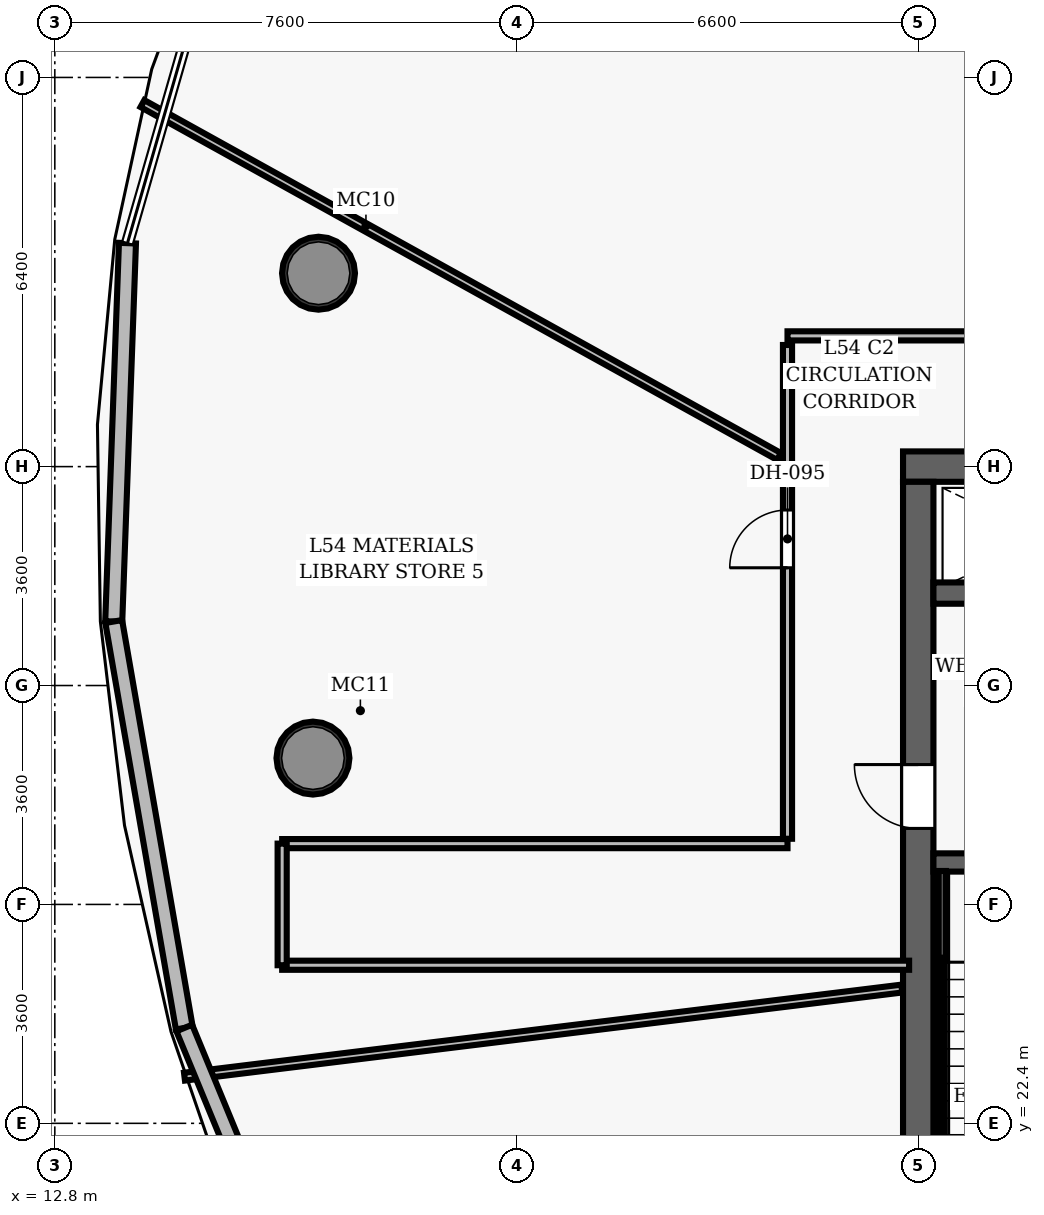
"""IFC4 building model, lengths in metres.
Left out: names, types, materials, properties, quantities, classifications, styles, units other than length and angle.
Written with IfcOpenShell. Run it as: python <this file> out.ifc"""

import sys

from ifc_helpers import new_model, si_unit, direction, frame, frame_2d, origin, origin_2d, place, context, subcontext, project, spatial, rectangle, hollow_circle, extrude, element, fill, save


model = new_model("IFC4")
c1 = context("Model", 3, precision=1e-05, world=origin(), true_north=direction((0.0, 1.0)))
c2 = subcontext(c1, "Body", "Model", "MODEL_VIEW")
j1 = project(units=[si_unit("LENGTHUNIT", "METRE"), si_unit("PLANEANGLEUNIT", "RADIAN")], contexts=[c1])
p1 = place(None, origin())
s1 = spatial("IfcSite", under=j1, at=p1, CompositionType="ELEMENT")
p2 = place(p1, origin())
s2 = spatial("IfcBuilding", under=s1, at=p2, CompositionType="ELEMENT")
p3 = place(p2, frame((0.0, 0.0, 213.55)))
s3 = spatial("IfcBuildingStorey", under=s2, at=p3, CompositionType="ELEMENT", Elevation=213.55)
p4 = place(p3, frame((26.75, 33.2, 0.0), z_axis=(0.0, 0.0, 1.0), x_axis=(1.0, 0.0, 0.0)))
e1 = element("IfcWall", 1, at=p4, inside=s3, PredefinedType="SHEAR", context=c2, shape_type="SweptSolid", body=[
    extrude(rectangle(XDim=22.5, YDim=0.5, at=frame_2d((11.25, 0.0))), origin(), (0.0, 0.0, 1.0), 3.85),
])
p5 = place(p4, frame((4.57, 0.0, 0.0)))
e2 = element("IfcOpeningElement", 2, at=p5, cuts=e1, PredefinedType="OPENING", context=c2, shape_type="SweptSolid", body=[
    extrude(rectangle(XDim=1.05, YDim=2.15, at=frame_2d((0.525, 1.075))), frame((0.0, 0.26, 0.0), z_axis=(0.0, -1.0, 0.0), x_axis=(1.0, 0.0, 0.0)), (0.0, 0.0, 1.0), 0.52),
])
p6 = place(p4, frame((14.47, 0.0, 0.0)))
e3 = element("IfcOpeningElement", 3, at=p6, cuts=e1, PredefinedType="OPENING", context=c2, shape_type="SweptSolid", body=[
    extrude(rectangle(XDim=1.05, YDim=2.15, at=frame_2d((0.525, 1.075))), frame((0.0, 0.26, 0.0), z_axis=(0.0, -1.0, 0.0), x_axis=(1.0, 0.0, 0.0)), (0.0, 0.0, 1.0), 0.52),
])
p7 = place(p3, frame((27.0, 19.05, 0.0), z_axis=(0.0, 0.0, 1.0), x_axis=(0.0, 1.0, 0.0)))
e4 = element("IfcWall", 4, at=p7, inside=s3, PredefinedType="SHEAR", context=c2, shape_type="SweptSolid", body=[
    extrude(rectangle(XDim=13.9, YDim=0.5, at=frame_2d((6.95, 0.0))), origin(), (0.0, 0.0, 1.0), 3.85),
])
p8 = place(p7, frame((8.2, 0.0, 0.0)))
e5 = element("IfcOpeningElement", 5, at=p8, cuts=e4, PredefinedType="OPENING", context=c2, shape_type="SweptSolid", body=[
    extrude(rectangle(XDim=1.05, YDim=2.15, at=frame_2d((0.525, 1.075))), frame((0.0, 0.26, 0.0), z_axis=(0.0, -1.0, 0.0), x_axis=(1.0, 0.0, 0.0)), (0.0, 0.0, 1.0), 0.52),
])
for number, where, z_axis, x_axis in (
    (6, (17.137, 36.381, 0.0), (0.0, 0.0, 1.0), (1.0, 0.0, 0.0)),
    (7, (17.045, 28.406, 0.0), (0.0, 0.0, 1.0), (1.0, 0.0, 0.0)),
):
    element("IfcColumn", number, at=place(p3, frame(where, z_axis=z_axis, x_axis=x_axis)), inside=s3, PredefinedType="COLUMN", context=c2, shape_type="SweptSolid", body=[
        extrude(hollow_circle(Radius=0.6, WallThickness=0.05, at=origin_2d()), origin(), (0.0, 0.0, 1.0), 3.85),
    ])
p9 = place(p3, frame((27.25, 26.69, 0.0), z_axis=(0.0, 0.0, 1.0), x_axis=(1.0, 0.0, 0.0)))
e8 = element("IfcWall", 8, at=p9, inside=s3, PredefinedType="SHEAR", context=c2, shape_type="SweptSolid", body=[
    extrude(rectangle(XDim=3.67, YDim=0.3, at=frame_2d((1.835, 0.0))), origin(), (0.0, 0.0, 1.0), 3.85),
])
p10 = place(p9, frame((1.05, 0.0, 0.0)))
e9 = element("IfcOpeningElement", 9, at=p10, cuts=e8, PredefinedType="OPENING", context=c2, shape_type="SweptSolid", body=[
    extrude(rectangle(XDim=1.1, YDim=2.15, at=frame_2d((0.55, 1.075))), frame((0.0, 0.16, 0.0), z_axis=(0.0, -1.0, 0.0), x_axis=(1.0, 0.0, 0.0)), (0.0, 0.0, 1.0), 0.32),
])
p11 = place(p3, frame((27.395, 19.1, 0.0), z_axis=(0.0, 0.0, 1.0), x_axis=(0.0, 1.0, 0.0)))
e10 = element("IfcWall", 10, at=p11, inside=s3, PredefinedType="SHEAR", context=c2, shape_type="SweptSolid", body=[
    extrude(rectangle(XDim=7.45, YDim=0.12, at=frame_2d((3.725, 0.0))), origin(), (0.0, 0.0, 1.0), 3.85),
])
p12 = place(p3, frame((27.25, 31.12, 0.0), z_axis=(0.0, 0.0, 1.0), x_axis=(1.0, 0.0, 0.0)))
e11 = element("IfcWall", 11, at=p12, inside=s3, PredefinedType="SHEAR", context=c2, shape_type="SweptSolid", body=[
    extrude(rectangle(XDim=3.67, YDim=0.35, at=frame_2d((1.835, 0.0))), origin(), (0.0, 0.0, 1.0), 3.035),
])
p13 = place(p12, frame((1.25, 0.0, 0.0)))
e12 = element("IfcOpeningElement", 12, at=p13, cuts=e11, PredefinedType="OPENING", context=c2, shape_type="SweptSolid", body=[
    extrude(rectangle(XDim=1.1, YDim=2.15, at=frame_2d((0.55, 1.075))), frame((0.0, 0.185, 0.0), z_axis=(0.0, -1.0, 0.0), x_axis=(1.0, 0.0, 0.0)), (0.0, 0.0, 1.0), 0.37),
])
p14 = place(p3, frame((24.85, 35.35, 0.0), z_axis=(0.0, 0.0, 1.0), x_axis=(1.0, 0.0, 0.0)))
e13 = element("IfcWall", 13, at=p14, inside=s3, PredefinedType="PARTITIONING", context=c2, shape_type="SweptSolid", body=[
    extrude(rectangle(XDim=26.0, YDim=0.15, at=frame_2d((13.0, 0.0))), origin(), (0.0, 0.0, 1.0), 3.035),
])
p15 = place(p14, frame((16.182, 0.0, 0.0)))
e14 = element("IfcOpeningElement", 14, at=p15, cuts=e13, PredefinedType="OPENING", context=c2, shape_type="SweptSolid", body=[
    extrude(rectangle(XDim=1.5, YDim=2.2, at=frame_2d((0.75, 1.1))), frame((0.0, 0.085, 0.0), z_axis=(0.0, -1.0, 0.0), x_axis=(1.0, 0.0, 0.0)), (0.0, 0.0, 1.0), 0.17),
])
p16 = place(p14, frame((10.36, 0.0, 0.0)))
e15 = element("IfcOpeningElement", 15, at=p16, cuts=e13, PredefinedType="OPENING", context=c2, shape_type="SweptSolid", body=[
    extrude(rectangle(XDim=0.95, YDim=2.15, at=frame_2d((0.475, 1.075))), frame((0.0, 0.085, 0.0), z_axis=(0.0, -1.0, 0.0), x_axis=(1.0, 0.0, 0.0)), (0.0, 0.0, 1.0), 0.17),
])
p17 = place(p14, frame((6.298, 0.0, 0.0)))
e16 = element("IfcOpeningElement", 16, at=p17, cuts=e13, PredefinedType="OPENING", context=c2, shape_type="SweptSolid", body=[
    extrude(rectangle(XDim=0.95, YDim=2.15, at=frame_2d((0.475, 1.075))), frame((0.0, 0.085, 0.0), z_axis=(0.0, -1.0, 0.0), x_axis=(1.0, 0.0, 0.0)), (0.0, 0.0, 1.0), 0.17),
])
p18 = place(p3, frame((24.85, 27.08, 0.0), z_axis=(0.0, 0.0, 1.0), x_axis=(0.0, 1.0, 0.0)))
e17 = element("IfcWall", 17, at=p18, inside=s3, PredefinedType="PARTITIONING", context=c2, shape_type="SweptSolid", body=[
    extrude(rectangle(XDim=8.12, YDim=0.15, at=frame_2d((4.06, 0.0))), origin(), (0.0, 0.0, 1.0), 3.035),
])
p19 = place(p18, frame((4.456, 0.0, 0.0)))
e18 = element("IfcOpeningElement", 18, at=p19, cuts=e17, PredefinedType="OPENING", context=c2, shape_type="SweptSolid", body=[
    extrude(rectangle(XDim=0.95, YDim=2.15, at=frame_2d((0.475, 1.075))), frame((0.0, 0.085, 0.0), z_axis=(0.0, -1.0, 0.0), x_axis=(1.0, 0.0, 0.0)), (0.0, 0.0, 1.0), 0.17),
])
p20 = place(p3, frame((16.539, 27.0, 0.0), z_axis=(0.0, 0.0, 1.0), x_axis=(1.0, 0.0, 0.0)))
e19 = element("IfcWall", 19, at=p20, inside=s3, PredefinedType="PARTITIONING", context=c2, shape_type="SweptSolid", body=[
    extrude(rectangle(XDim=8.311, YDim=0.15, at=frame_2d((4.156, 0.0))), origin(), (0.0, 0.0, 1.0), 3.035),
])
p21 = place(p3, frame((16.539, 25.0, 0.0), z_axis=(0.0, 0.0, 1.0), x_axis=(1.0, 0.0, 0.0)))
e20 = element("IfcWall", 20, at=p21, inside=s3, PredefinedType="PARTITIONING", context=c2, shape_type="SweptSolid", body=[
    extrude(rectangle(XDim=10.311, YDim=0.15, at=frame_2d((5.156, 0.0))), origin(), (0.0, 0.0, 1.0), 3.035),
])
p22 = place(p3, frame((16.539, 25.0, 0.0), z_axis=(0.0, 0.0, 1.0), x_axis=(0.0, 1.0, 0.0)))
e21 = element("IfcWall", 21, at=p22, inside=s3, PredefinedType="PARTITIONING", context=c2, shape_type="SweptSolid", body=[
    extrude(rectangle(XDim=2.0, YDim=0.15, at=frame_2d((1.0, 0.0))), origin(), (0.0, 0.0, 1.0), 3.035),
])
p23 = place(p3, frame((33.575, 35.49, 0.0), z_axis=(0.0, 0.0, 1.0), x_axis=(-0.422608843955, 0.906312178563, 0.0)))
e22 = element("IfcWall", 22, at=p23, inside=s3, PredefinedType="PARTITIONING", context=c2, shape_type="SweptSolid", body=[
    extrude(rectangle(XDim=16.332, YDim=0.13, at=frame_2d((8.166, 0.0))), origin(), (0.0, 0.0, 1.0), 3.035),
])
p24 = place(p3, frame((24.71, 33.367, 0.0), z_axis=(0.0, 0.0, 1.0), x_axis=(-0.874613881737, 0.484820129402, 0.0)))
e23 = element("IfcWall", 23, at=p24, inside=s3, PredefinedType="PARTITIONING", context=c2, shape_type="SweptSolid", body=[
    extrude(rectangle(XDim=11.97, YDim=0.13, at=frame_2d((5.985, 0.0))), origin(), (0.0, 0.0, 1.0), 3.035),
])
p25 = place(p3, frame((26.73, 24.616, 0.0), z_axis=(0.0, 0.0, 1.0), x_axis=(-0.992544457944, -0.121883136673, 0.0)))
e24 = element("IfcWall", 24, at=p25, inside=s3, PredefinedType="PARTITIONING", context=c2, shape_type="SweptSolid", body=[
    extrude(rectangle(XDim=11.886, YDim=0.13, at=frame_2d((5.943, 0.0))), origin(), (0.0, 0.0, 1.0), 3.035),
])
p26 = place(p3, frame((13.769, 30.653, 0.0), z_axis=(0.0, 0.0, 1.0), x_axis=(0.036270554674, 0.999342006954, 0.0)))
e25 = element("IfcWall", 25, at=p26, inside=s3, PredefinedType="SOLIDWALL", context=c2, shape_type="SweptSolid", body=[
    extrude(rectangle(XDim=6.226, YDim=0.28, at=frame_2d((3.113, 0.0))), origin(), (0.0, 0.0, 1.0), 3.62),
])
p27 = place(p3, frame((14.929, 23.968, 0.0), z_axis=(0.0, 0.0, 1.0), x_axis=(-0.171035922685, 0.985264793419, 0.0)))
e26 = element("IfcWall", 26, at=p27, inside=s3, PredefinedType="SOLIDWALL", context=c2, shape_type="SweptSolid", body=[
    extrude(rectangle(XDim=6.784, YDim=0.28, at=frame_2d((3.392, 0.0))), origin(), (0.0, 0.0, 1.0), 3.62),
])
p28 = place(p3, frame((17.604, 17.48, 0.0), z_axis=(0.0, 0.0, 1.0), x_axis=(-0.381218688328, 0.924484889909, 0.0)))
e27 = element("IfcWall", 27, at=p28, inside=s3, PredefinedType="SOLIDWALL", context=c2, shape_type="SweptSolid", body=[
    extrude(rectangle(XDim=7.018, YDim=0.28, at=frame_2d((3.509, 0.0))), origin(), (0.0, 0.0, 1.0), 3.62),
])
p29 = place(p8, origin())
e28 = element("IfcDoor", 28, at=p29, inside=s3, OperationType="SINGLE_SWING_RIGHT", PredefinedType="DOOR", context=c2, shape_type="SweptSolid", body=[
    extrude(rectangle(XDim=1.05, YDim=2.15, at=frame_2d((0.525, 1.075))), frame((0.0, 0.025, 0.0), z_axis=(0.0, -1.0, 0.0), x_axis=(1.0, 0.0, 0.0)), (0.0, 0.0, 1.0), 0.05),
])
fill(e5, e28)
p30 = place(p19, origin())
e29 = element("IfcDoor", 29, at=p30, inside=s3, OperationType="SINGLE_SWING_LEFT", PredefinedType="DOOR", context=c2, shape_type="SweptSolid", body=[
    extrude(rectangle(XDim=0.95, YDim=2.15, at=frame_2d((0.475, 1.075))), frame((0.0, 0.025, 0.0), z_axis=(0.0, -1.0, 0.0), x_axis=(1.0, 0.0, 0.0)), (0.0, 0.0, 1.0), 0.05),
])
fill(e18, e29)
save(model, sys.argv[1])
